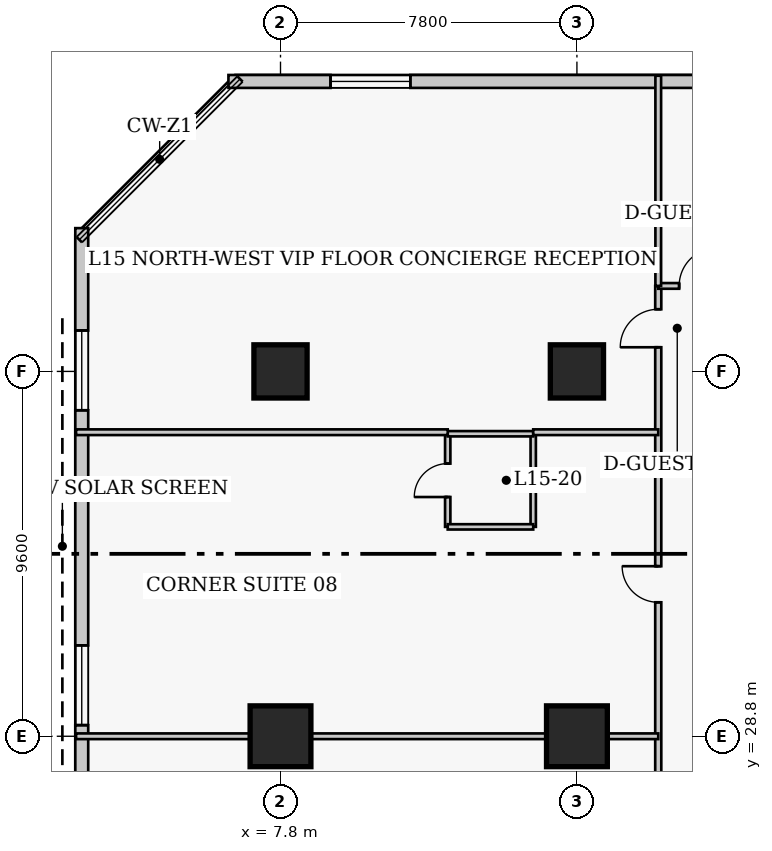
"""IFC4 building model, lengths in metres.
Left out: names, types, materials, properties, quantities, classifications, styles, units other than length and angle.
Written with IfcOpenShell. Run it as: python <this file> out.ifc"""

import sys

from ifc_helpers import new_model, si_unit, direction, frame, frame_2d, origin, origin_2d, place, context, subcontext, project, spatial, rectangle, extrude, element, fill, save


model = new_model("IFC4")
c1 = context("Model", 3, precision=1e-05, world=origin(), true_north=direction((0.0, 1.0)))
c2 = subcontext(c1, "Body", "Model", "MODEL_VIEW")
j1 = project(units=[si_unit("LENGTHUNIT", "METRE"), si_unit("PLANEANGLEUNIT", "RADIAN")], contexts=[c1])
p1 = place(None, origin())
s1 = spatial("IfcSite", under=j1, at=p1, CompositionType="ELEMENT")
p2 = place(p1, origin())
s2 = spatial("IfcBuilding", under=s1, at=p2, CompositionType="ELEMENT")
p3 = place(p2, frame((0.0, 0.0, 64.0)))
s3 = spatial("IfcBuildingStorey", under=s2, at=p3, CompositionType="ELEMENT", Elevation=64.0)
p4 = place(p3, frame((7.8, 28.8, 0.0), z_axis=(0.0, 0.0, 1.0), x_axis=(1.0, 0.0, 0.0)))
e1 = element("IfcColumn", 1, at=p4, inside=s3, PredefinedType="COLUMN", context=c2, shape_type="SweptSolid", body=[
    extrude(rectangle(XDim=1.6, YDim=1.6, at=origin_2d()), origin(), (0.0, 0.0, 1.0), 3.8),
])
p5 = place(p3, frame((7.8, 38.4, 0.0), z_axis=(0.0, 0.0, 1.0), x_axis=(1.0, 0.0, 0.0)))
e2 = element("IfcColumn", 2, at=p5, inside=s3, PredefinedType="COLUMN", context=c2, shape_type="SweptSolid", body=[
    extrude(rectangle(XDim=1.4, YDim=1.4, at=origin_2d()), origin(), (0.0, 0.0, 1.0), 3.8),
])
p6 = place(p3, frame((15.6, 28.8, 0.0), z_axis=(0.0, 0.0, 1.0), x_axis=(1.0, 0.0, 0.0)))
e3 = element("IfcColumn", 3, at=p6, inside=s3, PredefinedType="COLUMN", context=c2, shape_type="SweptSolid", body=[
    extrude(rectangle(XDim=1.6, YDim=1.6, at=origin_2d()), origin(), (0.0, 0.0, 1.0), 3.8),
])
p7 = place(p3, frame((15.6, 38.4, 0.0), z_axis=(0.0, 0.0, 1.0), x_axis=(1.0, 0.0, 0.0)))
e4 = element("IfcColumn", 4, at=p7, inside=s3, PredefinedType="COLUMN", context=c2, shape_type="SweptSolid", body=[
    extrude(rectangle(XDim=1.4, YDim=1.4, at=origin_2d()), origin(), (0.0, 0.0, 1.0), 3.8),
])
p8 = place(p3, frame((36.32, 46.03, 0.0), z_axis=(0.0, 0.0, 1.0), x_axis=(-1.0, 0.0, 0.0)))
e5 = element("IfcWall", 5, at=p8, inside=s3, PredefinedType="SOLIDWALL", context=c2, shape_type="SweptSolid", body=[
    extrude(rectangle(XDim=29.89, YDim=0.34, at=frame_2d((14.945, 0.0))), origin(), (0.0, 0.0, 1.0), 3.54),
])
p9 = place(p8, frame((2.686, 0.0, 0.85)))
e6 = element("IfcOpeningElement", 6, at=p9, cuts=e5, PredefinedType="OPENING", context=c2, shape_type="SweptSolid", body=[
    extrude(rectangle(XDim=2.1, YDim=1.85, at=frame_2d((1.05, 0.925))), frame((0.0, 0.18, 0.0), z_axis=(0.0, -1.0, 0.0), x_axis=(1.0, 0.0, 0.0)), (0.0, 0.0, 1.0), 0.36),
])
p10 = place(p8, frame((10.159, 0.0, 0.85)))
e7 = element("IfcOpeningElement", 7, at=p10, cuts=e5, PredefinedType="OPENING", context=c2, shape_type="SweptSolid", body=[
    extrude(rectangle(XDim=2.1, YDim=1.85, at=frame_2d((1.05, 0.925))), frame((0.0, 0.18, 0.0), z_axis=(0.0, -1.0, 0.0), x_axis=(1.0, 0.0, 0.0)), (0.0, 0.0, 1.0), 0.36),
])
p11 = place(p8, frame((25.104, 0.0, 0.85)))
e8 = element("IfcOpeningElement", 8, at=p11, cuts=e5, PredefinedType="OPENING", context=c2, shape_type="SweptSolid", body=[
    extrude(rectangle(XDim=2.1, YDim=1.85, at=frame_2d((1.05, 0.925))), frame((0.0, 0.18, 0.0), z_axis=(0.0, -1.0, 0.0), x_axis=(1.0, 0.0, 0.0)), (0.0, 0.0, 1.0), 0.36),
])
p12 = place(p3, frame((2.57, 42.17, 0.0), z_axis=(0.0, 0.0, 1.0), x_axis=(0.0, -1.0, 0.0)))
e9 = element("IfcWall", 9, at=p12, inside=s3, PredefinedType="SOLIDWALL", context=c2, shape_type="SweptSolid", body=[
    extrude(rectangle(XDim=35.14, YDim=0.34, at=frame_2d((17.57, 0.0))), origin(), (0.0, 0.0, 1.0), 3.54),
])
p13 = place(p12, frame((2.692, 0.0, 0.85)))
e10 = element("IfcOpeningElement", 10, at=p13, cuts=e9, PredefinedType="OPENING", context=c2, shape_type="SweptSolid", body=[
    extrude(rectangle(XDim=2.1, YDim=1.85, at=frame_2d((1.05, 0.925))), frame((0.0, 0.18, 0.0), z_axis=(0.0, -1.0, 0.0), x_axis=(1.0, 0.0, 0.0)), (0.0, 0.0, 1.0), 0.36),
])
p14 = place(p12, frame((10.978, 0.0, 0.85)))
e11 = element("IfcOpeningElement", 11, at=p14, cuts=e9, PredefinedType="OPENING", context=c2, shape_type="SweptSolid", body=[
    extrude(rectangle(XDim=2.1, YDim=1.85, at=frame_2d((1.05, 0.925))), frame((0.0, 0.18, 0.0), z_axis=(0.0, -1.0, 0.0), x_axis=(1.0, 0.0, 0.0)), (0.0, 0.0, 1.0), 0.36),
])
p15 = place(p12, frame((19.762, 0.0, 0.85)))
e12 = element("IfcOpeningElement", 12, at=p15, cuts=e9, PredefinedType="OPENING", context=c2, shape_type="SweptSolid", body=[
    extrude(rectangle(XDim=2.1, YDim=1.85, at=frame_2d((1.05, 0.925))), frame((0.0, 0.18, 0.0), z_axis=(0.0, -1.0, 0.0), x_axis=(1.0, 0.0, 0.0)), (0.0, 0.0, 1.0), 0.36),
])
p16 = place(p12, frame((28.548, 0.0, 0.85)))
e13 = element("IfcOpeningElement", 13, at=p16, cuts=e9, PredefinedType="OPENING", context=c2, shape_type="SweptSolid", body=[
    extrude(rectangle(XDim=2.1, YDim=1.85, at=frame_2d((1.05, 0.925))), frame((0.0, 0.18, 0.0), z_axis=(0.0, -1.0, 0.0), x_axis=(1.0, 0.0, 0.0)), (0.0, 0.0, 1.0), 0.36),
])
p17 = place(p3, frame((17.74, 5.05, 0.0), z_axis=(0.0, 0.0, 1.0), x_axis=(0.0, 1.0, 0.0)))
e14 = element("IfcWall", 14, at=p17, inside=s3, PredefinedType="PARTITIONING", context=c2, shape_type="SweptSolid", body=[
    extrude(rectangle(XDim=35.6, YDim=0.16, at=frame_2d((17.8, 0.0))), origin(), (0.0, 0.0, 1.0), 3.54),
])
p18 = place(p17, frame((2.6, 0.0, 0.0)))
e15 = element("IfcOpeningElement", 15, at=p18, cuts=e14, PredefinedType="OPENING", context=c2, shape_type="SweptSolid", body=[
    extrude(rectangle(XDim=0.95, YDim=2.1, at=frame_2d((0.475, 1.05))), frame((0.0, 0.09, 0.0), z_axis=(0.0, -1.0, 0.0), x_axis=(1.0, 0.0, 0.0)), (0.0, 0.0, 1.0), 0.18),
])
p19 = place(p17, frame((10.075, 0.0, 0.0)))
e16 = element("IfcOpeningElement", 16, at=p19, cuts=e14, PredefinedType="OPENING", context=c2, shape_type="SweptSolid", body=[
    extrude(rectangle(XDim=0.95, YDim=2.1, at=frame_2d((0.475, 1.05))), frame((0.0, 0.09, 0.0), z_axis=(0.0, -1.0, 0.0), x_axis=(1.0, 0.0, 0.0)), (0.0, 0.0, 1.0), 0.18),
])
p20 = place(p17, frame((18.875, 0.0, 0.0)))
e17 = element("IfcOpeningElement", 17, at=p20, cuts=e14, PredefinedType="OPENING", context=c2, shape_type="SweptSolid", body=[
    extrude(rectangle(XDim=0.95, YDim=2.1, at=frame_2d((0.475, 1.05))), frame((0.0, 0.09, 0.0), z_axis=(0.0, -1.0, 0.0), x_axis=(1.0, 0.0, 0.0)), (0.0, 0.0, 1.0), 0.18),
])
p21 = place(p17, frame((27.275, 0.0, 0.0)))
e18 = element("IfcOpeningElement", 18, at=p21, cuts=e14, PredefinedType="OPENING", context=c2, shape_type="SweptSolid", body=[
    extrude(rectangle(XDim=0.95, YDim=2.1, at=frame_2d((0.475, 1.05))), frame((0.0, 0.09, 0.0), z_axis=(0.0, -1.0, 0.0), x_axis=(1.0, 0.0, 0.0)), (0.0, 0.0, 1.0), 0.18),
])
p22 = place(p17, frame((33.986, 0.0, 0.0)))
e19 = element("IfcOpeningElement", 19, at=p22, cuts=e14, PredefinedType="OPENING", context=c2, shape_type="SweptSolid", body=[
    extrude(rectangle(XDim=1.0, YDim=2.15, at=frame_2d((0.5, 1.075))), frame((0.0, 0.09, 0.0), z_axis=(0.0, -1.0, 0.0), x_axis=(1.0, 0.0, 0.0)), (0.0, 0.0, 1.0), 0.18),
])
p23 = place(p3, frame((17.74, 40.65, 0.0), z_axis=(0.0, 0.0, 1.0), x_axis=(1.0, 0.0, 0.0)))
e20 = element("IfcWall", 20, at=p23, inside=s3, PredefinedType="PARTITIONING", context=c2, shape_type="SweptSolid", body=[
    extrude(rectangle(XDim=4.36, YDim=0.15, at=frame_2d((2.18, 0.0))), origin(), (0.0, 0.0, 1.0), 3.54),
])
p24 = place(p23, frame((0.55, 0.0, 0.0)))
e21 = element("IfcOpeningElement", 21, at=p24, cuts=e20, PredefinedType="OPENING", context=c2, shape_type="SweptSolid", body=[
    extrude(rectangle(XDim=1.0, YDim=2.15, at=frame_2d((0.5, 1.075))), frame((0.0, 0.085, 0.0), z_axis=(0.0, -1.0, 0.0), x_axis=(1.0, 0.0, 0.0)), (0.0, 0.0, 1.0), 0.17),
])
p25 = place(p3, frame((17.74, 40.65, 0.0), z_axis=(0.0, 0.0, 1.0), x_axis=(0.0, 1.0, 0.0)))
e22 = element("IfcWall", 22, at=p25, inside=s3, PredefinedType="PARTITIONING", context=c2, shape_type="SweptSolid", body=[
    extrude(rectangle(XDim=5.53, YDim=0.15, at=frame_2d((2.765, 0.0))), origin(), (0.0, 0.0, 1.0), 3.54),
])
p26 = place(p3, frame((2.42, 28.8, 0.0), z_axis=(0.0, 0.0, 1.0), x_axis=(1.0, 0.0, 0.0)))
e23 = element("IfcWall", 23, at=p26, inside=s3, PredefinedType="PARTITIONING", context=c2, shape_type="SweptSolid", body=[
    extrude(rectangle(XDim=15.32, YDim=0.15, at=frame_2d((7.66, 0.0))), origin(), (0.0, 0.0, 1.0), 2.593),
])
p27 = place(p3, frame((12.2, 34.31, 0.0), z_axis=(0.0, 0.0, 1.0), x_axis=(0.0, 1.0, 0.0)))
e24 = element("IfcWall", 24, at=p27, inside=s3, PredefinedType="PLUMBINGWALL", context=c2, shape_type="SweptSolid", body=[
    extrude(rectangle(XDim=2.45, YDim=0.14, at=frame_2d((1.225, 0.0))), origin(), (0.0, 0.0, 1.0), 3.54),
])
p28 = place(p27, frame((0.785, 0.0, 0.0)))
e25 = element("IfcOpeningElement", 25, at=p28, cuts=e24, PredefinedType="OPENING", context=c2, shape_type="SweptSolid", body=[
    extrude(rectangle(XDim=0.88, YDim=2.05, at=frame_2d((0.44, 1.025))), frame((0.0, 0.08, 0.0), z_axis=(0.0, -1.0, 0.0), x_axis=(1.0, 0.0, 0.0)), (0.0, 0.0, 1.0), 0.16),
])
p29 = place(p3, frame((14.45, 34.31, 0.0), z_axis=(0.0, 0.0, 1.0), x_axis=(0.0, 1.0, 0.0)))
e26 = element("IfcWall", 26, at=p29, inside=s3, PredefinedType="PLUMBINGWALL", context=c2, shape_type="SweptSolid", body=[
    extrude(rectangle(XDim=2.45, YDim=0.14, at=frame_2d((1.225, 0.0))), origin(), (0.0, 0.0, 1.0), 3.54),
])
for number, where, z_axis, x_axis in (
    (27, (12.2, 34.31, 0.0), (0.0, 0.0, 1.0), (1.0, 0.0, 0.0)),
    (28, (12.2, 36.76, 0.0), (0.0, 0.0, 1.0), (1.0, 0.0, 0.0)),
):
    element("IfcWall", number, at=place(p3, frame(where, z_axis=z_axis, x_axis=x_axis)), inside=s3, PredefinedType="PLUMBINGWALL", context=c2, shape_type="SweptSolid", body=[
        extrude(rectangle(XDim=2.25, YDim=0.14, at=frame_2d((1.125, 0.0))), origin(), (0.0, 0.0, 1.0), 3.54),
    ])
p30 = place(p3, frame((2.42, 36.8, 0.0), z_axis=(0.0, 0.0, 1.0), x_axis=(1.0, 0.0, 0.0)))
e29 = element("IfcWall", 29, at=p30, inside=s3, PredefinedType="PARTITIONING", context=c2, shape_type="SweptSolid", body=[
    extrude(rectangle(XDim=9.78, YDim=0.15, at=frame_2d((4.89, 0.0))), origin(), (0.0, 0.0, 1.0), 3.54),
])
p31 = place(p3, frame((14.45, 36.8, 0.0), z_axis=(0.0, 0.0, 1.0), x_axis=(1.0, 0.0, 0.0)))
e30 = element("IfcWall", 30, at=p31, inside=s3, PredefinedType="PARTITIONING", context=c2, shape_type="SweptSolid", body=[
    extrude(rectangle(XDim=3.29, YDim=0.15, at=frame_2d((1.645, 0.0))), origin(), (0.0, 0.0, 1.0), 3.54),
])
p32 = place(p11, origin())
e31 = element("IfcWindow", 31, at=p32, inside=s3, PartitioningType="SINGLE_PANEL", PredefinedType="WINDOW", context=c2, shape_type="SweptSolid", body=[
    extrude(rectangle(XDim=2.1, YDim=1.85, at=frame_2d((1.05, 0.925))), frame((0.0, 0.03, 0.0), z_axis=(0.0, -1.0, 0.0), x_axis=(1.0, 0.0, 0.0)), (0.0, 0.0, 1.0), 0.06),
])
fill(e8, e31)
p33 = place(p13, origin())
e32 = element("IfcWindow", 32, at=p33, inside=s3, PartitioningType="SINGLE_PANEL", PredefinedType="WINDOW", context=c2, shape_type="SweptSolid", body=[
    extrude(rectangle(XDim=2.1, YDim=1.85, at=frame_2d((1.05, 0.925))), frame((0.0, 0.03, 0.0), z_axis=(0.0, -1.0, 0.0), x_axis=(1.0, 0.0, 0.0)), (0.0, 0.0, 1.0), 0.06),
])
fill(e10, e32)
p34 = place(p14, origin())
e33 = element("IfcWindow", 33, at=p34, inside=s3, PartitioningType="SINGLE_PANEL", PredefinedType="WINDOW", context=c2, shape_type="SweptSolid", body=[
    extrude(rectangle(XDim=2.1, YDim=1.85, at=frame_2d((1.05, 0.925))), frame((0.0, 0.03, 0.0), z_axis=(0.0, -1.0, 0.0), x_axis=(1.0, 0.0, 0.0)), (0.0, 0.0, 1.0), 0.06),
])
fill(e11, e33)
p35 = place(p24, origin())
e34 = element("IfcDoor", 34, at=p35, inside=s3, OperationType="SINGLE_SWING_RIGHT", PredefinedType="DOOR", context=c2, shape_type="SweptSolid", body=[
    extrude(rectangle(XDim=1.0, YDim=2.15, at=frame_2d((0.5, 1.075))), frame((0.0, 0.025, 0.0), z_axis=(0.0, -1.0, 0.0), x_axis=(1.0, 0.0, 0.0)), (0.0, 0.0, 1.0), 0.05),
])
fill(e21, e34)
p36 = place(p28, origin())
e35 = element("IfcDoor", 35, at=p36, inside=s3, OperationType="SINGLE_SWING_LEFT", PredefinedType="DOOR", context=c2, shape_type="SweptSolid", body=[
    extrude(rectangle(XDim=0.88, YDim=2.05, at=frame_2d((0.44, 1.025))), frame((0.0, 0.025, 0.0), z_axis=(0.0, -1.0, 0.0), x_axis=(1.0, 0.0, 0.0)), (0.0, 0.0, 1.0), 0.05),
])
fill(e25, e35)
p37 = place(p21, origin())
e36 = element("IfcDoor", 36, at=p37, inside=s3, OperationType="SINGLE_SWING_RIGHT", PredefinedType="DOOR", context=c2, shape_type="SweptSolid", body=[
    extrude(rectangle(XDim=0.95, YDim=2.1, at=frame_2d((0.475, 1.05))), frame((0.0, 0.025, 0.0), z_axis=(0.0, -1.0, 0.0), x_axis=(1.0, 0.0, 0.0)), (0.0, 0.0, 1.0), 0.05),
])
fill(e18, e36)
p38 = place(p22, origin())
e37 = element("IfcDoor", 37, at=p38, inside=s3, OperationType="SINGLE_SWING_LEFT", PredefinedType="DOOR", context=c2, shape_type="SweptSolid", body=[
    extrude(rectangle(XDim=1.0, YDim=2.15, at=frame_2d((0.5, 1.075))), frame((0.0, 0.025, 0.0), z_axis=(0.0, -1.0, 0.0), x_axis=(1.0, 0.0, 0.0)), (0.0, 0.0, 1.0), 0.05),
])
fill(e19, e37)
save(model, sys.argv[1])
